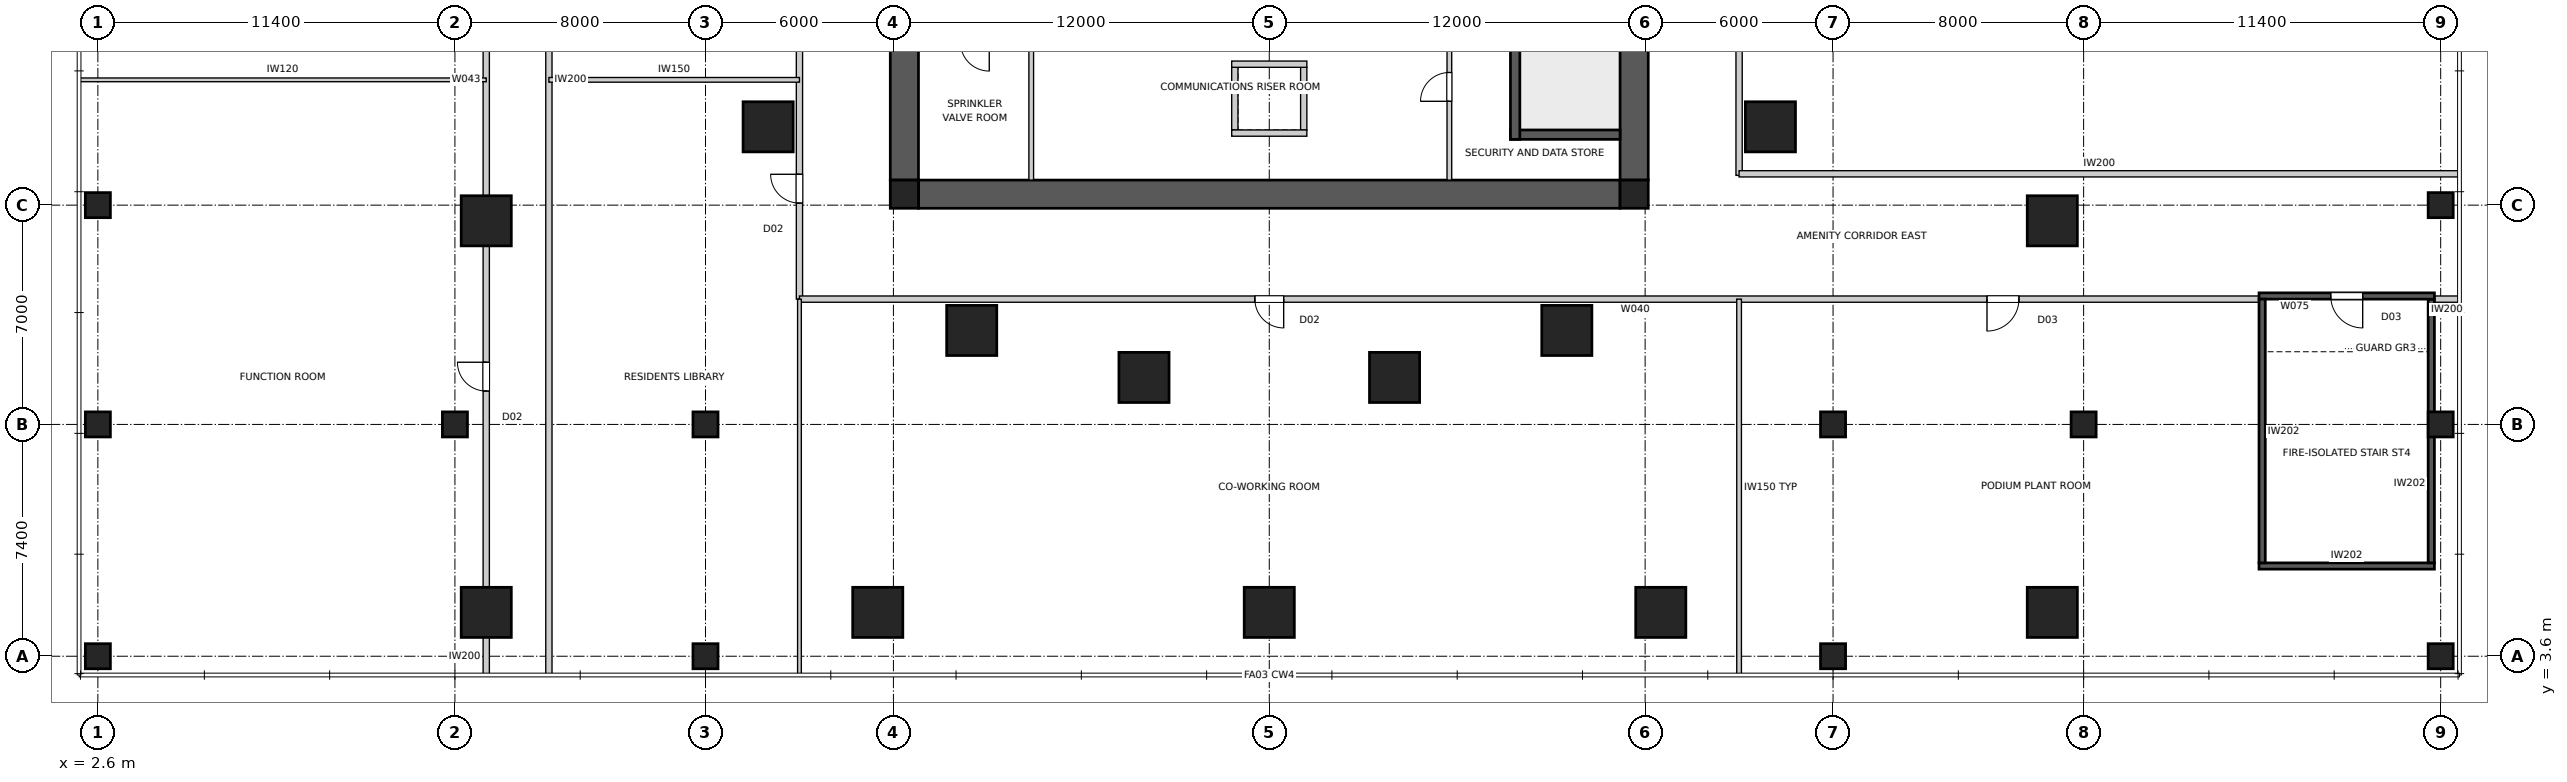
"""IFC4 building model, lengths in metres.
Left out: names, types, materials, properties, quantities, classifications, styles, units other than length and angle.
Written with IfcOpenShell. Run it as: python <this file> out.ifc"""

import sys

from ifc_helpers import new_model, si_unit, direction, frame, frame_2d, origin, origin_2d, place, context, subcontext, project, spatial, polyline, rectangle, outline, extrude, element, fill, save


model = new_model("IFC4")
c1 = context("Model", 3, precision=1e-05, world=origin(), true_north=direction((0.0, 1.0)))
c2 = subcontext(c1, "Body", "Model", "MODEL_VIEW")
j1 = project(units=[si_unit("LENGTHUNIT", "METRE"), si_unit("PLANEANGLEUNIT", "RADIAN")], contexts=[c1])
p1 = place(None, origin())
s1 = spatial("IfcSite", under=j1, at=p1, CompositionType="ELEMENT")
p2 = place(p1, origin())
s2 = spatial("IfcBuilding", under=s1, at=p2, CompositionType="ELEMENT")
p3 = place(p2, frame((0.0, 0.0, 10.5)))
s3 = spatial("IfcBuildingStorey", under=s2, at=p3, CompositionType="ELEMENT", Elevation=10.5)
p4 = place(p3, frame((51.2, 18.35, 0.0), z_axis=(0.0, 0.0, 1.0), x_axis=(-1.0, 0.0, 0.0)))
e1 = element("IfcWall", 1, at=p4, inside=s3, PredefinedType="SHEAR", context=c2, shape_type="SweptSolid", body=[
    extrude(outline(polyline([(0.0, -0.45), (22.4, -0.45), (22.4, -0.025), (22.85, -0.025), (22.85, 0.025), (22.4, 0.025), (22.4, 0.45), (0.0, 0.45), (0.0, 0.025), (-0.45, 0.025), (-0.45, -0.025), (0.0, -0.025), (0.0, -0.45)])), origin(), (0.0, 0.0, 1.0), 4.5),
])
p5 = place(p3, frame((51.65, 18.8, 0.0), z_axis=(0.0, 0.0, 1.0), x_axis=(0.0, 1.0, 0.0)))
e2 = element("IfcWall", 2, at=p5, inside=s3, PredefinedType="SHEAR", context=c2, shape_type="SweptSolid", body=[
    extrude(outline(polyline([(0.0, -0.45), (22.4, -0.45), (22.4, -0.025), (22.85, -0.025), (22.85, 0.025), (22.4, 0.025), (22.4, 0.45), (0.0, 0.45), (0.0, 0.025), (-0.45, 0.025), (-0.45, -0.025), (0.0, -0.025), (0.0, -0.45)])), origin(), (0.0, 0.0, 1.0), 4.5),
])
p6 = place(p5, frame((11.14, 0.0, 0.0)))
e3 = element("IfcOpeningElement", 3, at=p6, cuts=e2, PredefinedType="OPENING", context=c2, shape_type="SweptSolid", body=[
    extrude(rectangle(XDim=1.02, YDim=2.4, at=frame_2d((0.51, 1.2))), frame((0.0, 0.46, 0.0), z_axis=(0.0, -1.0, 0.0), x_axis=(1.0, 0.0, 0.0)), (0.0, 0.0, 1.0), 0.92),
])
p7 = place(p3, frame((28.35, 41.2, 0.0), z_axis=(0.0, 0.0, 1.0), x_axis=(0.0, -1.0, 0.0)))
e4 = element("IfcWall", 4, at=p7, inside=s3, PredefinedType="SHEAR", context=c2, shape_type="SweptSolid", body=[
    extrude(outline(polyline([(0.0, -0.45), (22.4, -0.45), (22.4, -0.025), (22.85, -0.025), (22.85, 0.025), (22.4, 0.025), (22.4, 0.45), (0.0, 0.45), (0.0, 0.025), (-0.45, 0.025), (-0.45, -0.025), (0.0, -0.025), (0.0, -0.45)])), origin(), (0.0, 0.0, 1.0), 4.5),
])
p8 = place(p7, frame((11.14, 0.0, 0.0)))
e5 = element("IfcOpeningElement", 5, at=p8, cuts=e4, PredefinedType="OPENING", context=c2, shape_type="SweptSolid", body=[
    extrude(rectangle(XDim=1.02, YDim=2.4, at=frame_2d((0.51, 1.2))), frame((0.0, 0.46, 0.0), z_axis=(0.0, -1.0, 0.0), x_axis=(1.0, 0.0, 0.0)), (0.0, 0.0, 1.0), 0.92),
])
p9 = place(p3, frame((47.85, 27.8, 0.0), z_axis=(0.0, 0.0, 1.0), x_axis=(0.0, -1.0, 0.0)))
e6 = element("IfcWall", 6, at=p9, inside=s3, PredefinedType="SHEAR", context=c2, shape_type="SweptSolid", body=[
    extrude(rectangle(XDim=7.7, YDim=0.3, at=frame_2d((3.85, 0.0))), origin(), (0.0, 0.0, 1.0), 4.5),
])
p10 = place(p3, frame((51.2, 20.25, 0.0), z_axis=(0.0, 0.0, 1.0), x_axis=(-1.0, 0.0, 0.0)))
e7 = element("IfcWall", 7, at=p10, inside=s3, PredefinedType="SHEAR", context=c2, shape_type="SweptSolid", body=[
    extrude(rectangle(XDim=3.5, YDim=0.3, at=frame_2d((1.75, 0.0))), origin(), (0.0, 0.0, 1.0), 4.5),
])
for number, where, z_axis, x_axis in (
    (8, (38.9, 22.4, 0.0), (0.0, 0.0, 1.0), (0.0, -1.0, 0.0)),
    (9, (41.1, 22.4, 0.0), (0.0, 0.0, 1.0), (0.0, -1.0, 0.0)),
):
    element("IfcWall", number, at=place(p3, frame(where, z_axis=z_axis, x_axis=x_axis)), inside=s3, PredefinedType="SOLIDWALL", context=c2, shape_type="SweptSolid", body=[
        extrude(rectangle(XDim=2.0, YDim=0.2, at=frame_2d((1.0, 0.0))), origin(), (0.0, 0.0, 1.0), 4.5),
    ])
for number, where, z_axis, x_axis in (
    (10, (38.8, 22.5, 0.0), (0.0, 0.0, 1.0), (1.0, 0.0, 0.0)),
    (11, (38.8, 20.3, 0.0), (0.0, 0.0, 1.0), (1.0, 0.0, 0.0)),
):
    element("IfcWall", number, at=place(p3, frame(where, z_axis=z_axis, x_axis=x_axis)), inside=s3, PredefinedType="SOLIDWALL", context=c2, shape_type="SweptSolid", body=[
        extrude(rectangle(XDim=2.4, YDim=0.2, at=frame_2d((1.2, 0.0))), origin(), (0.0, 0.0, 1.0), 4.5),
    ])
for number, where, z_axis, x_axis in (
    (12, (28.35, 18.35, 0.0), (0.0, 0.0, 1.0), (1.0, 0.0, 0.0)),
    (13, (51.65, 18.35, 0.0), (0.0, 0.0, 1.0), (1.0, 0.0, 0.0)),
):
    element("IfcColumn", number, at=place(p3, frame(where, z_axis=z_axis, x_axis=x_axis)), inside=s3, PredefinedType="COLUMN", context=c2, shape_type="SweptSolid", body=[
        extrude(rectangle(XDim=0.9, YDim=0.9, at=origin_2d()), origin(), (0.0, 0.0, 1.0), 4.5),
    ])
for number, where, z_axis, x_axis in (
    (14, (15.0, 5.0, 0.0), (0.0, 0.0, 1.0), (1.0, 0.0, 0.0)),
    (15, (27.5, 5.0, 0.0), (0.0, 0.0, 1.0), (1.0, 0.0, 0.0)),
    (16, (40.0, 5.0, 0.0), (0.0, 0.0, 1.0), (1.0, 0.0, 0.0)),
    (17, (52.5, 5.0, 0.0), (0.0, 0.0, 1.0), (1.0, 0.0, 0.0)),
    (18, (65.0, 5.0, 0.0), (0.0, 0.0, 1.0), (1.0, 0.0, 0.0)),
    (19, (65.0, 17.5, 0.0), (0.0, 0.0, 1.0), (1.0, 0.0, 0.0)),
    (20, (15.0, 17.5, 0.0), (0.0, 0.0, 1.0), (1.0, 0.0, 0.0)),
):
    element("IfcColumn", number, at=place(p3, frame(where, z_axis=z_axis, x_axis=x_axis)), inside=s3, PredefinedType="COLUMN", context=c2, shape_type="SweptSolid", body=[
        extrude(rectangle(XDim=1.6, YDim=1.6, at=origin_2d()), origin(), (0.0, 0.0, 1.0), 4.5),
    ])
for number, where, z_axis, x_axis in (
    (21, (2.6, 3.6, 0.0), (0.0, 0.0, 1.0), (1.0, 0.0, 0.0)),
    (22, (2.6, 11.0, 0.0), (0.0, 0.0, 1.0), (1.0, 0.0, 0.0)),
    (23, (2.6, 18.0, 0.0), (0.0, 0.0, 1.0), (1.0, 0.0, 0.0)),
    (24, (14.0, 11.0, 0.0), (0.0, 0.0, 1.0), (1.0, 0.0, 0.0)),
    (25, (22.0, 3.6, 0.0), (0.0, 0.0, 1.0), (1.0, 0.0, 0.0)),
    (26, (22.0, 11.0, 0.0), (0.0, 0.0, 1.0), (1.0, 0.0, 0.0)),
    (27, (58.0, 3.6, 0.0), (0.0, 0.0, 1.0), (1.0, 0.0, 0.0)),
    (28, (58.0, 11.0, 0.0), (0.0, 0.0, 1.0), (1.0, 0.0, 0.0)),
    (29, (66.0, 11.0, 0.0), (0.0, 0.0, 1.0), (1.0, 0.0, 0.0)),
    (30, (77.4, 3.6, 0.0), (0.0, 0.0, 1.0), (1.0, 0.0, 0.0)),
    (31, (77.4, 11.0, 0.0), (0.0, 0.0, 1.0), (1.0, 0.0, 0.0)),
    (32, (77.4, 18.0, 0.0), (0.0, 0.0, 1.0), (1.0, 0.0, 0.0)),
):
    element("IfcColumn", number, at=place(p3, frame(where, z_axis=z_axis, x_axis=x_axis)), inside=s3, PredefinedType="COLUMN", context=c2, shape_type="SweptSolid", body=[
        extrude(rectangle(XDim=0.8, YDim=0.8, at=origin_2d()), origin(), (0.0, 0.0, 1.0), 4.5),
    ])
for number, where, z_axis, x_axis in (
    (33, (24.0, 20.5, 0.0), (0.0, 0.0, 1.0), (1.0, 0.0, 0.0)),
    (34, (30.5, 14.0, 0.0), (0.0, 0.0, 1.0), (1.0, 0.0, 0.0)),
    (35, (36.0, 12.5, 0.0), (0.0, 0.0, 1.0), (1.0, 0.0, 0.0)),
    (36, (44.0, 12.5, 0.0), (0.0, 0.0, 1.0), (1.0, 0.0, 0.0)),
    (37, (49.5, 14.0, 0.0), (0.0, 0.0, 1.0), (1.0, 0.0, 0.0)),
    (38, (56.0, 20.5, 0.0), (0.0, 0.0, 1.0), (1.0, 0.0, 0.0)),
):
    element("IfcColumn", number, at=place(p3, frame(where, z_axis=z_axis, x_axis=x_axis)), inside=s3, PredefinedType="COLUMN", context=c2, shape_type="SweptSolid", body=[
        extrude(rectangle(XDim=1.6, YDim=1.6, at=origin_2d()), origin(), (0.0, 0.0, 1.0), 4.5),
    ])
p11 = place(p3, frame((71.6, 6.48, 0.0), z_axis=(0.0, 0.0, 1.0), x_axis=(1.0, 0.0, 0.0)))
e39 = element("IfcWall", 39, at=p11, inside=s3, PredefinedType="SOLIDWALL", context=c2, shape_type="SweptSolid", body=[
    extrude(rectangle(XDim=5.6, YDim=0.2, at=frame_2d((2.8, 0.0))), origin(), (0.0, 0.0, 1.0), 4.35),
])
p12 = place(p3, frame((77.1, 6.58, 0.0), z_axis=(0.0, 0.0, 1.0), x_axis=(0.0, 1.0, 0.0)))
e40 = element("IfcWall", 40, at=p12, inside=s3, PredefinedType="SOLIDWALL", context=c2, shape_type="SweptSolid", body=[
    extrude(rectangle(XDim=8.42, YDim=0.2, at=frame_2d((4.21, 0.0))), origin(), (0.0, 0.0, 1.0), 4.35),
])
p13 = place(p3, frame((77.2, 15.1, 0.0), z_axis=(0.0, 0.0, 1.0), x_axis=(-1.0, 0.0, 0.0)))
e41 = element("IfcWall", 41, at=p13, inside=s3, PredefinedType="SOLIDWALL", context=c2, shape_type="SweptSolid", body=[
    extrude(rectangle(XDim=5.6, YDim=0.2, at=frame_2d((2.8, 0.0))), origin(), (0.0, 0.0, 1.0), 4.35),
])
p14 = place(p13, frame((2.29, 0.0, 0.0)))
e42 = element("IfcOpeningElement", 42, at=p14, cuts=e41, PredefinedType="OPENING", context=c2, shape_type="SweptSolid", body=[
    extrude(rectangle(XDim=1.02, YDim=2.1, at=frame_2d((0.51, 1.05))), frame((0.0, 0.11, 0.0), z_axis=(0.0, -1.0, 0.0), x_axis=(1.0, 0.0, 0.0)), (0.0, 0.0, 1.0), 0.22),
])
p15 = place(p3, frame((71.7, 15.0, 0.0), z_axis=(0.0, 0.0, 1.0), x_axis=(0.0, -1.0, 0.0)))
e43 = element("IfcWall", 43, at=p15, inside=s3, PredefinedType="SOLIDWALL", context=c2, shape_type="SweptSolid", body=[
    extrude(rectangle(XDim=8.42, YDim=0.2, at=frame_2d((4.21, 0.0))), origin(), (0.0, 0.0, 1.0), 4.35),
])
p16 = place(p3, frame((45.75, 18.8, 0.0), z_axis=(0.0, 0.0, 1.0), x_axis=(0.0, 1.0, 0.0)))
e44 = element("IfcWall", 44, at=p16, inside=s3, PredefinedType="SOLIDWALL", context=c2, shape_type="SweptSolid", body=[
    extrude(rectangle(XDim=5.95, YDim=0.15, at=frame_2d((2.975, 0.0))), origin(), (0.0, 0.0, 1.0), 4.35),
])
p17 = place(p16, frame((2.515, 0.0, 0.0)))
e45 = element("IfcOpeningElement", 45, at=p17, cuts=e44, PredefinedType="OPENING", context=c2, shape_type="SweptSolid", body=[
    extrude(rectangle(XDim=0.92, YDim=2.1, at=frame_2d((0.46, 1.05))), frame((0.0, 0.085, 0.0), z_axis=(0.0, -1.0, 0.0), x_axis=(1.0, 0.0, 0.0)), (0.0, 0.0, 1.0), 0.17),
])
p18 = place(p3, frame((32.4, 18.8, 0.0), z_axis=(0.0, 0.0, 1.0), x_axis=(0.0, 1.0, 0.0)))
e46 = element("IfcWall", 46, at=p18, inside=s3, PredefinedType="SOLIDWALL", context=c2, shape_type="SweptSolid", body=[
    extrude(rectangle(XDim=5.9, YDim=0.15, at=frame_2d((2.95, 0.0))), origin(), (0.0, 0.0, 1.0), 4.35),
])
p19 = place(p3, frame((25.0, 15.0, 0.0), z_axis=(0.0, 0.0, 1.0), x_axis=(0.0, 1.0, 0.0)))
e47 = element("IfcWall", 47, at=p19, inside=s3, PredefinedType="PARTITIONING", context=c2, shape_type="SweptSolid", body=[
    extrude(rectangle(XDim=26.05, YDim=0.2, at=frame_2d((13.025, 0.0))), origin(), (0.0, 0.0, 1.0), 4.35),
])
p20 = place(p19, frame((15.99, 0.0, 0.0)))
e48 = element("IfcOpeningElement", 48, at=p20, cuts=e47, PredefinedType="OPENING", context=c2, shape_type="SweptSolid", body=[
    extrude(rectangle(XDim=1.02, YDim=2.1, at=frame_2d((0.51, 1.05))), frame((0.0, 0.11, 0.0), z_axis=(0.0, -1.0, 0.0), x_axis=(1.0, 0.0, 0.0)), (0.0, 0.0, 1.0), 0.22),
])
p21 = place(p19, frame((3.065, 0.0, 0.0)))
e49 = element("IfcOpeningElement", 49, at=p21, cuts=e47, PredefinedType="OPENING", context=c2, shape_type="SweptSolid", body=[
    extrude(rectangle(XDim=0.92, YDim=2.34, at=frame_2d((0.46, 1.17))), frame((0.0, 0.11, 0.0), z_axis=(0.0, -1.0, 0.0), x_axis=(1.0, 0.0, 0.0)), (0.0, 0.0, 1.0), 0.22),
])
p22 = place(p3, frame((71.6, 15.0, 0.0), z_axis=(0.0, 0.0, 1.0), x_axis=(-1.0, 0.0, 0.0)))
e50 = element("IfcWall", 50, at=p22, inside=s3, PredefinedType="PARTITIONING", context=c2, shape_type="SweptSolid", body=[
    extrude(rectangle(XDim=46.6, YDim=0.2, at=frame_2d((23.3, 0.0))), origin(), (0.0, 0.0, 1.0), 4.35),
])
p23 = place(p22, frame((31.14, 0.0, 0.0)))
e51 = element("IfcOpeningElement", 51, at=p23, cuts=e50, PredefinedType="OPENING", context=c2, shape_type="SweptSolid", body=[
    extrude(rectangle(XDim=0.92, YDim=2.34, at=frame_2d((0.46, 1.17))), frame((0.0, 0.11, 0.0), z_axis=(0.0, -1.0, 0.0), x_axis=(1.0, 0.0, 0.0)), (0.0, 0.0, 1.0), 0.22),
])
p24 = place(p22, frame((7.665, 0.0, 0.0)))
e52 = element("IfcOpeningElement", 52, at=p24, cuts=e50, PredefinedType="OPENING", context=c2, shape_type="SweptSolid", body=[
    extrude(rectangle(XDim=1.02, YDim=2.1, at=frame_2d((0.51, 1.05))), frame((0.0, 0.11, 0.0), z_axis=(0.0, -1.0, 0.0), x_axis=(1.0, 0.0, 0.0)), (0.0, 0.0, 1.0), 0.22),
])
p25 = place(p3, frame((55.0, 45.0, 0.0), z_axis=(0.0, 0.0, 1.0), x_axis=(0.0, -1.0, 0.0)))
e53 = element("IfcWall", 53, at=p25, inside=s3, PredefinedType="PARTITIONING", context=c2, shape_type="SweptSolid", body=[
    extrude(rectangle(XDim=26.05, YDim=0.2, at=frame_2d((13.025, 0.0))), origin(), (0.0, 0.0, 1.0), 4.35),
])
p26 = place(p25, frame((7.015, 0.0, 0.0)))
e54 = element("IfcOpeningElement", 54, at=p26, cuts=e53, PredefinedType="OPENING", context=c2, shape_type="SweptSolid", body=[
    extrude(rectangle(XDim=1.02, YDim=2.1, at=frame_2d((0.51, 1.05))), frame((0.0, 0.11, 0.0), z_axis=(0.0, -1.0, 0.0), x_axis=(1.0, 0.0, 0.0)), (0.0, 0.0, 1.0), 0.22),
])
p27 = place(p25, frame((20.04, 0.0, 0.0)))
e55 = element("IfcOpeningElement", 55, at=p27, cuts=e53, PredefinedType="OPENING", context=c2, shape_type="SweptSolid", body=[
    extrude(rectangle(XDim=0.92, YDim=2.34, at=frame_2d((0.46, 1.17))), frame((0.0, 0.11, 0.0), z_axis=(0.0, -1.0, 0.0), x_axis=(1.0, 0.0, 0.0)), (0.0, 0.0, 1.0), 0.22),
])
p28 = place(p3, frame((15.0, 3.0, 0.0), z_axis=(0.0, 0.0, 1.0), x_axis=(0.0, 1.0, 0.0)))
e56 = element("IfcWall", 56, at=p28, inside=s3, PredefinedType="PARTITIONING", context=c2, shape_type="SweptSolid", body=[
    extrude(rectangle(XDim=2.0, YDim=0.2, at=frame_2d((1.0, 0.0))), origin(), (0.0, 0.0, 1.0), 4.35),
])
p29 = place(p3, frame((15.0, 5.0, 0.0), z_axis=(0.0, 0.0, 1.0), x_axis=(0.0, 1.0, 0.0)))
e57 = element("IfcWall", 57, at=p29, inside=s3, PredefinedType="PARTITIONING", context=c2, shape_type="SweptSolid", body=[
    extrude(rectangle(XDim=36.0, YDim=0.2, at=frame_2d((18.0, 0.0))), origin(), (0.0, 0.0, 1.0), 3.534),
])
p30 = place(p29, frame((7.065, 0.0, 0.0)))
e58 = element("IfcOpeningElement", 58, at=p30, cuts=e57, PredefinedType="OPENING", context=c2, shape_type="SweptSolid", body=[
    extrude(rectangle(XDim=0.92, YDim=2.34, at=frame_2d((0.46, 1.17))), frame((0.0, 0.11, 0.0), z_axis=(0.0, -1.0, 0.0), x_axis=(1.0, 0.0, 0.0)), (0.0, 0.0, 1.0), 0.22),
])
p31 = place(p29, frame((26.015, 0.0, 0.0)))
e59 = element("IfcOpeningElement", 59, at=p31, cuts=e57, PredefinedType="OPENING", context=c2, shape_type="SweptSolid", body=[
    extrude(rectangle(XDim=0.92, YDim=2.34, at=frame_2d((0.46, 1.17))), frame((0.0, 0.11, 0.0), z_axis=(0.0, -1.0, 0.0), x_axis=(1.0, 0.0, 0.0)), (0.0, 0.0, 1.0), 0.22),
])
p32 = place(p3, frame((17.0, 41.0, 0.0), z_axis=(0.0, 0.0, 1.0), x_axis=(0.0, -1.0, 0.0)))
e60 = element("IfcWall", 60, at=p32, inside=s3, PredefinedType="PARTITIONING", context=c2, shape_type="SweptSolid", body=[
    extrude(rectangle(XDim=38.0, YDim=0.2, at=frame_2d((19.0, 0.0))), origin(), (0.0, 0.0, 1.0), 4.35),
])
p33 = place(p3, frame((78.0, 15.0, 0.0), z_axis=(0.0, 0.0, 1.0), x_axis=(-1.0, 0.0, 0.0)))
e61 = element("IfcWall", 61, at=p33, inside=s3, PredefinedType="PARTITIONING", context=c2, shape_type="SweptSolid", body=[
    extrude(rectangle(XDim=0.8, YDim=0.2, at=frame_2d((0.4, 0.0))), origin(), (0.0, 0.0, 1.0), 4.35),
])
p34 = place(p3, frame((55.0, 19.0, 0.0), z_axis=(0.0, 0.0, 1.0), x_axis=(1.0, 0.0, 0.0)))
e62 = element("IfcWall", 62, at=p34, inside=s3, PredefinedType="PARTITIONING", context=c2, shape_type="SweptSolid", body=[
    extrude(rectangle(XDim=23.0, YDim=0.2, at=frame_2d((11.5, 0.0))), origin(), (0.0, 0.0, 1.0), 4.35),
])
p35 = place(p3, frame((2.0, 22.0, 0.0), z_axis=(0.0, 0.0, 1.0), x_axis=(1.0, 0.0, 0.0)))
e63 = element("IfcWall", 63, at=p35, inside=s3, PredefinedType="PARTITIONING", context=c2, shape_type="SweptSolid", body=[
    extrude(rectangle(XDim=13.0, YDim=0.12, at=frame_2d((6.5, 0.0))), origin(), (0.0, 0.0, 1.0), 4.35),
])
p36 = place(p3, frame((17.0, 22.0, 0.0), z_axis=(0.0, 0.0, 1.0), x_axis=(1.0, 0.0, 0.0)))
e64 = element("IfcWall", 64, at=p36, inside=s3, PredefinedType="SOLIDWALL", context=c2, shape_type="SweptSolid", body=[
    extrude(rectangle(XDim=8.0, YDim=0.15, at=frame_2d((4.0, 0.0))), origin(), (0.0, 0.0, 1.0), 4.35),
])
p37 = place(p3, frame((25.0, 15.0, 0.0), z_axis=(0.0, 0.0, 1.0), x_axis=(0.0, -1.0, 0.0)))
e65 = element("IfcWall", 65, at=p37, inside=s3, PredefinedType="PARTITIONING", context=c2, shape_type="SweptSolid", body=[
    extrude(rectangle(XDim=12.0, YDim=0.12, at=frame_2d((6.0, 0.0))), origin(), (0.0, 0.0, 1.0), 4.35),
])
p38 = place(p3, frame((55.0, 15.0, 0.0), z_axis=(0.0, 0.0, 1.0), x_axis=(0.0, -1.0, 0.0)))
e66 = element("IfcWall", 66, at=p38, inside=s3, PredefinedType="SOLIDWALL", context=c2, shape_type="SweptSolid", body=[
    extrude(rectangle(XDim=12.0, YDim=0.15, at=frame_2d((6.0, 0.0))), origin(), (0.0, 0.0, 1.0), 4.35),
])
p39 = place(p23, origin())
e67 = element("IfcDoor", 67, at=p39, inside=s3, OperationType="SINGLE_SWING_LEFT", PredefinedType="DOOR", context=c2, shape_type="SweptSolid", body=[
    extrude(rectangle(XDim=0.92, YDim=2.34, at=frame_2d((0.46, 1.17))), frame((0.0, 0.025, 0.0), z_axis=(0.0, -1.0, 0.0), x_axis=(1.0, 0.0, 0.0)), (0.0, 0.0, 1.0), 0.05),
])
fill(e51, e67)
p40 = place(p21, origin())
e68 = element("IfcDoor", 68, at=p40, inside=s3, OperationType="SINGLE_SWING_RIGHT", PredefinedType="DOOR", context=c2, shape_type="SweptSolid", body=[
    extrude(rectangle(XDim=0.92, YDim=2.34, at=frame_2d((0.46, 1.17))), frame((0.0, 0.025, 0.0), z_axis=(0.0, -1.0, 0.0), x_axis=(1.0, 0.0, 0.0)), (0.0, 0.0, 1.0), 0.05),
])
fill(e49, e68)
p41 = place(p30, origin())
e69 = element("IfcDoor", 69, at=p41, inside=s3, OperationType="SINGLE_SWING_RIGHT", PredefinedType="DOOR", context=c2, shape_type="SweptSolid", body=[
    extrude(rectangle(XDim=0.92, YDim=2.34, at=frame_2d((0.46, 1.17))), frame((0.0, 0.025, 0.0), z_axis=(0.0, -1.0, 0.0), x_axis=(1.0, 0.0, 0.0)), (0.0, 0.0, 1.0), 0.05),
])
fill(e58, e69)
p42 = place(p24, origin())
e70 = element("IfcDoor", 70, at=p42, inside=s3, OperationType="SINGLE_SWING_RIGHT", PredefinedType="DOOR", context=c2, shape_type="SweptSolid", body=[
    extrude(rectangle(XDim=1.02, YDim=2.1, at=frame_2d((0.51, 1.05))), frame((0.0, 0.025, 0.0), z_axis=(0.0, -1.0, 0.0), x_axis=(1.0, 0.0, 0.0)), (0.0, 0.0, 1.0), 0.05),
])
fill(e52, e70)
p43 = place(p14, origin())
e71 = element("IfcDoor", 71, at=p43, inside=s3, OperationType="SINGLE_SWING_LEFT", PredefinedType="DOOR", context=c2, shape_type="SweptSolid", body=[
    extrude(rectangle(XDim=1.02, YDim=2.1, at=frame_2d((0.51, 1.05))), frame((0.0, 0.025, 0.0), z_axis=(0.0, -1.0, 0.0), x_axis=(1.0, 0.0, 0.0)), (0.0, 0.0, 1.0), 0.05),
])
fill(e42, e71)
p44 = place(p17, origin())
e72 = element("IfcDoor", 72, at=p44, inside=s3, OperationType="SINGLE_SWING_LEFT", PredefinedType="DOOR", context=c2, shape_type="SweptSolid", body=[
    extrude(rectangle(XDim=0.92, YDim=2.1, at=frame_2d((0.46, 1.05))), frame((0.0, 0.025, 0.0), z_axis=(0.0, -1.0, 0.0), x_axis=(1.0, 0.0, 0.0)), (0.0, 0.0, 1.0), 0.05),
])
fill(e45, e72)
save(model, sys.argv[1])
